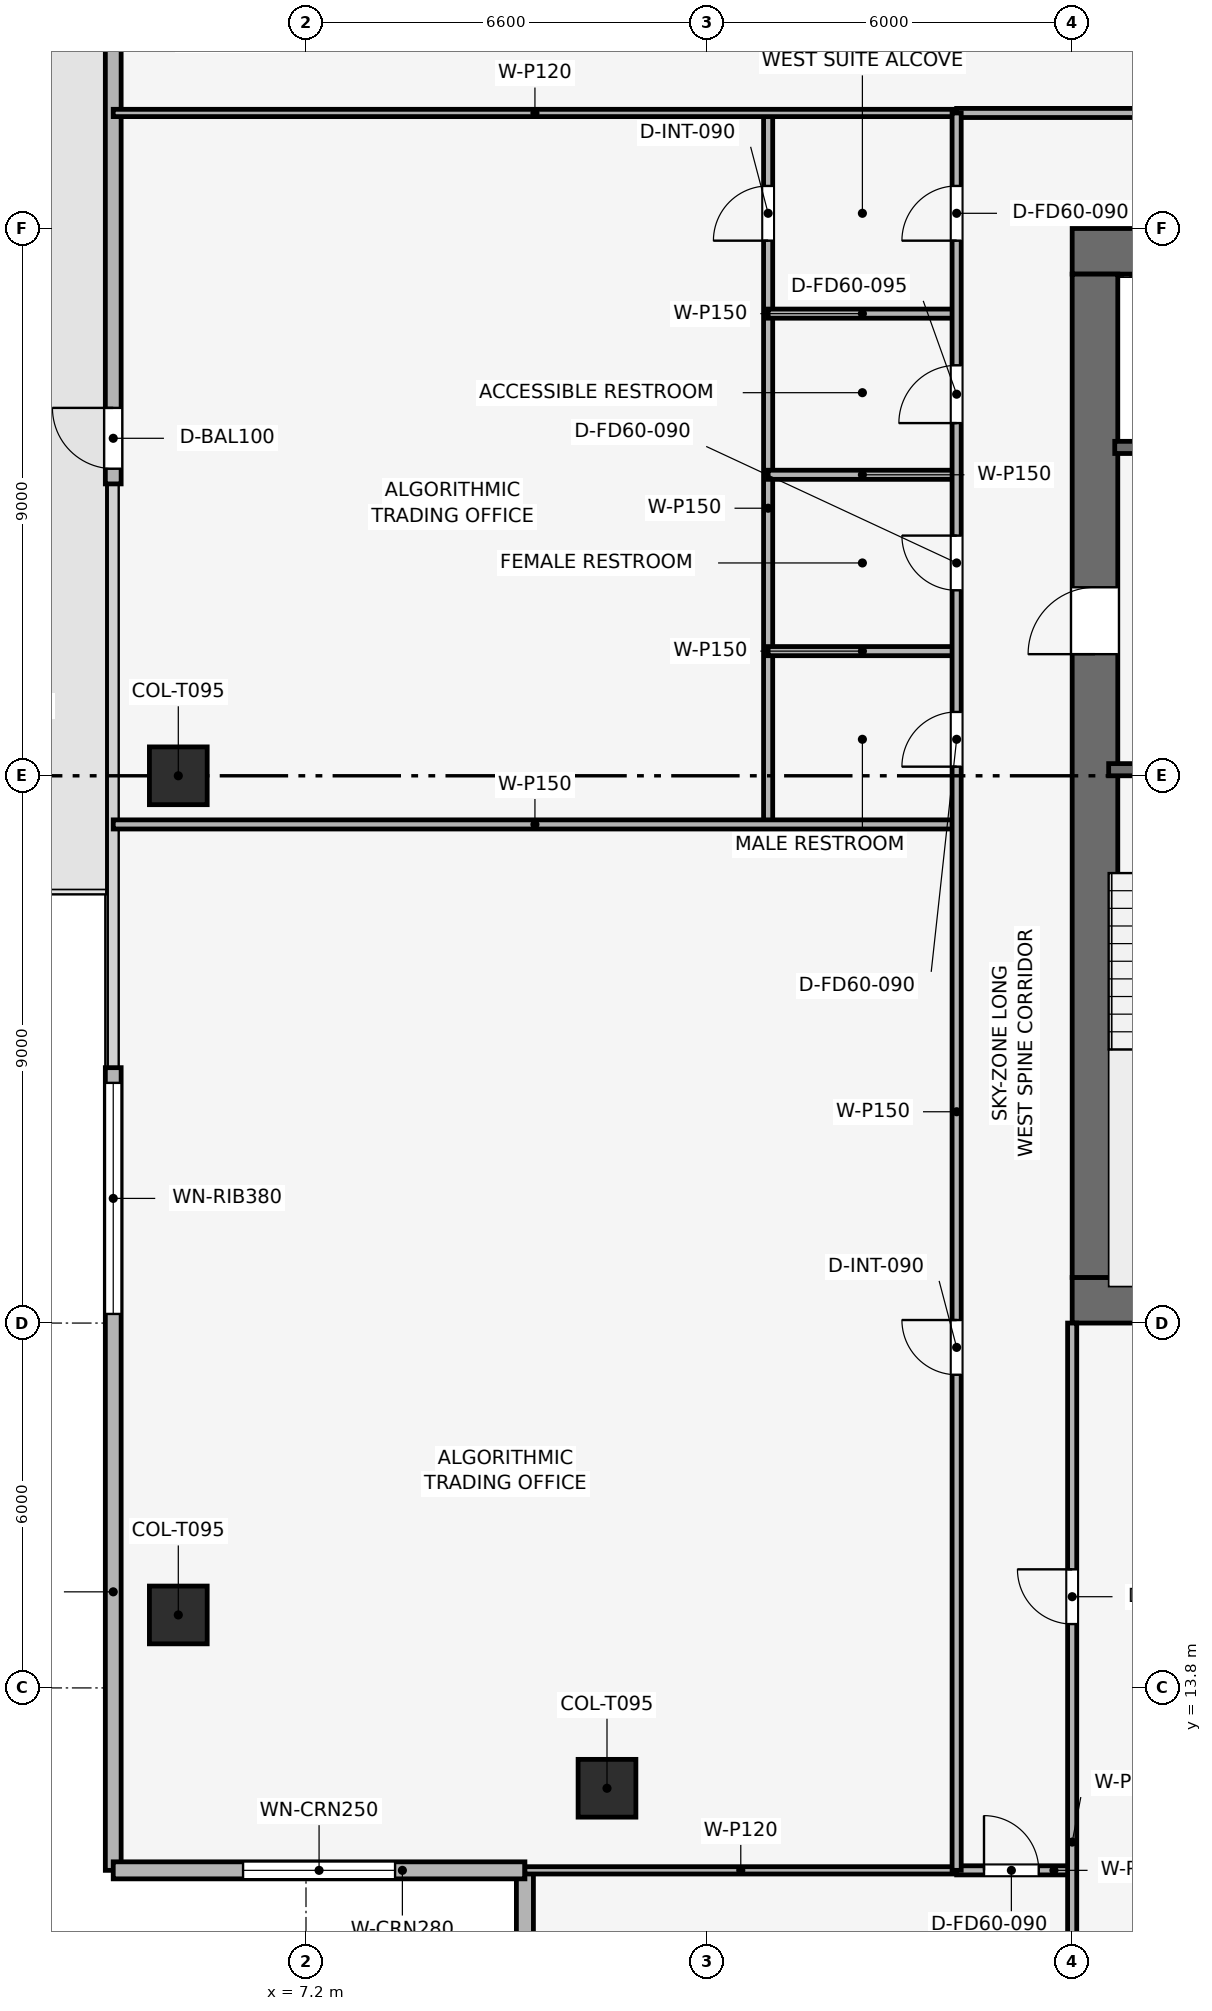
"""IFC4 building model, lengths in metres.
Left out: names, types, materials, properties, quantities, classifications, styles, units other than length and angle.
Written with IfcOpenShell. Run it as: python <this file> out.ifc"""

import sys

from ifc_helpers import new_model, si_unit, direction, frame, frame_2d, origin, origin_2d, place, context, subcontext, project, spatial, rectangle, extrude, element, fill, save


model = new_model("IFC4")
c1 = context("Model", 3, precision=1e-05, world=origin(), true_north=direction((0.0, 1.0)))
c2 = subcontext(c1, "Body", "Model", "MODEL_VIEW")
j1 = project(units=[si_unit("LENGTHUNIT", "METRE"), si_unit("PLANEANGLEUNIT", "RADIAN")], contexts=[c1])
p1 = place(None, origin())
s1 = spatial("IfcSite", under=j1, at=p1, CompositionType="ELEMENT")
p2 = place(p1, origin())
s2 = spatial("IfcBuilding", under=s1, at=p2, CompositionType="ELEMENT")
p3 = place(p2, frame((0.0, 0.0, 276.6)))
s3 = spatial("IfcBuildingStorey", under=s2, at=p3, CompositionType="ELEMENT", Elevation=276.6)
p4 = place(p3, frame((19.8, 20.175, 0.0), z_axis=(0.0, 0.0, 1.0), x_axis=(1.0, 0.0, 0.0)))
e1 = element("IfcWall", 1, at=p4, inside=s3, PredefinedType="SHEAR", context=c2, shape_type="SweptSolid", body=[
    extrude(rectangle(XDim=18.0, YDim=0.75, at=frame_2d((9.0, 0.0))), origin(), (0.0, 0.0, 1.0), 3.75),
])
p5 = place(p3, frame((19.8, 37.425, 0.0), z_axis=(0.0, 0.0, 1.0), x_axis=(1.0, 0.0, 0.0)))
e2 = element("IfcWall", 2, at=p5, inside=s3, PredefinedType="SHEAR", context=c2, shape_type="SweptSolid", body=[
    extrude(rectangle(XDim=18.0, YDim=0.75, at=frame_2d((9.0, 0.0))), origin(), (0.0, 0.0, 1.0), 3.75),
])
p6 = place(p5, frame((7.05, 0.0, 0.0)))
e3 = element("IfcOpeningElement", 3, at=p6, cuts=e2, PredefinedType="OPENING", context=c2, shape_type="SweptSolid", body=[
    extrude(rectangle(XDim=1.1, YDim=2.15, at=frame_2d((0.55, 1.075))), frame((0.0, 0.385, 0.0), z_axis=(0.0, -1.0, 0.0), x_axis=(1.0, 0.0, 0.0)), (0.0, 0.0, 1.0), 0.77),
])
p7 = place(p3, frame((20.175, 20.55, 0.0), z_axis=(0.0, 0.0, 1.0), x_axis=(0.0, 1.0, 0.0)))
e4 = element("IfcWall", 4, at=p7, inside=s3, PredefinedType="SHEAR", context=c2, shape_type="SweptSolid", body=[
    extrude(rectangle(XDim=16.5, YDim=0.75, at=frame_2d((8.25, 0.0))), origin(), (0.0, 0.0, 1.0), 3.75),
])
p8 = place(p7, frame((10.25, 0.0, 0.0)))
e5 = element("IfcOpeningElement", 5, at=p8, cuts=e4, PredefinedType="OPENING", context=c2, shape_type="SweptSolid", body=[
    extrude(rectangle(XDim=1.1, YDim=2.15, at=frame_2d((0.55, 1.075))), frame((0.0, 0.385, 0.0), z_axis=(0.0, -1.0, 0.0), x_axis=(1.0, 0.0, 0.0)), (0.0, 0.0, 1.0), 0.77),
])
for number, where, z_axis, x_axis in (
    (6, (5.1, 28.8, 0.003), (0.0, 0.0, 1.0), (1.0, 0.0, 0.0)),
    (7, (5.1, 15.0, 0.003), (0.0, 0.0, 1.0), (1.0, 0.0, 0.0)),
    (8, (12.15, 12.15, 0.003), (0.0, 0.0, 1.0), (1.0, 0.0, 0.0)),
):
    element("IfcColumn", number, at=place(p3, frame(where, z_axis=z_axis, x_axis=x_axis)), inside=s3, PredefinedType="COLUMN", context=c2, shape_type="SweptSolid", body=[
        extrude(rectangle(XDim=0.95, YDim=0.95, at=origin_2d()), origin(), (0.0, 0.0, 1.0), 3.494),
    ])
p9 = place(p3, frame((4.03, 10.8, 0.0), z_axis=(0.0, 0.0, 1.0), x_axis=(0.0, 1.0, 0.0)))
e9 = element("IfcWall", 9, at=p9, inside=s3, PredefinedType="SOLIDWALL", context=c2, shape_type="SweptSolid", body=[
    extrude(rectangle(XDim=13.2, YDim=0.26, at=frame_2d((6.6, 0.0))), origin(), (0.0, 0.0, 1.0), 3.5),
])
p10 = place(p9, frame((9.15, 0.0, 0.9)))
e10 = element("IfcOpeningElement", 10, at=p10, cuts=e9, PredefinedType="OPENING", context=c2, shape_type="SweptSolid", body=[
    extrude(rectangle(XDim=3.8, YDim=1.9, at=frame_2d((1.9, 0.95))), frame((0.0, 0.14, 0.0), z_axis=(0.0, -1.0, 0.0), x_axis=(1.0, 0.0, 0.0)), (0.0, 0.0, 1.0), 0.28),
])
p11 = place(p3, frame((4.03, 33.6, 0.0), z_axis=(0.0, 0.0, 1.0), x_axis=(0.0, 1.0, 0.0)))
e11 = element("IfcWall", 11, at=p11, inside=s3, PredefinedType="SOLIDWALL", context=c2, shape_type="SweptSolid", body=[
    extrude(rectangle(XDim=13.2, YDim=0.26, at=frame_2d((6.6, 0.0))), origin(), (0.0, 0.0, 1.0), 3.5),
])
p12 = place(p11, frame((0.25, 0.0, 0.0)))
e12 = element("IfcOpeningElement", 12, at=p12, cuts=e11, PredefinedType="OPENING", context=c2, shape_type="SweptSolid", body=[
    extrude(rectangle(XDim=1.0, YDim=2.2, at=frame_2d((0.5, 1.1))), frame((0.0, 0.14, 0.0), z_axis=(0.0, -1.0, 0.0), x_axis=(1.0, 0.0, 0.0)), (0.0, 0.0, 1.0), 0.28),
])
p13 = place(p3, frame((10.8, 4.03, 0.0), z_axis=(0.0, 0.0, 1.0), x_axis=(0.0, 1.0, 0.0)))
e13 = element("IfcWall", 13, at=p13, inside=s3, PredefinedType="SOLIDWALL", context=c2, shape_type="SweptSolid", body=[
    extrude(rectangle(XDim=6.77, YDim=0.28, at=frame_2d((3.385, 0.0))), origin(), (0.0, 0.0, 1.0), 3.5),
])
p14 = place(p13, frame((2.135, 0.0, 0.9)))
e14 = element("IfcOpeningElement", 14, at=p14, cuts=e13, PredefinedType="OPENING", context=c2, shape_type="SweptSolid", body=[
    extrude(rectangle(XDim=2.5, YDim=1.9, at=frame_2d((1.25, 0.95))), frame((0.0, 0.15, 0.0), z_axis=(0.0, -1.0, 0.0), x_axis=(1.0, 0.0, 0.0)), (0.0, 0.0, 1.0), 0.3),
])
p15 = place(p3, frame((10.8, 10.8, 0.0), z_axis=(0.0, 0.0, 1.0), x_axis=(-1.0, 0.0, 0.0)))
e15 = element("IfcWall", 15, at=p15, inside=s3, PredefinedType="SOLIDWALL", context=c2, shape_type="SweptSolid", body=[
    extrude(rectangle(XDim=6.77, YDim=0.28, at=frame_2d((3.385, 0.0))), origin(), (0.0, 0.0, 1.0), 3.5),
])
p16 = place(p15, frame((2.135, 0.0, 0.9)))
e16 = element("IfcOpeningElement", 16, at=p16, cuts=e15, PredefinedType="OPENING", context=c2, shape_type="SweptSolid", body=[
    extrude(rectangle(XDim=2.5, YDim=1.9, at=frame_2d((1.25, 0.95))), frame((0.0, 0.15, 0.0), z_axis=(0.0, -1.0, 0.0), x_axis=(1.0, 0.0, 0.0)), (0.0, 0.0, 1.0), 0.3),
])
p17 = place(p3, frame((20.4, 28.9, 0.0), z_axis=(0.0, 0.0, 1.0), x_axis=(1.0, 0.0, 0.0)))
e17 = element("IfcWall", 17, at=p17, inside=s3, PredefinedType="SHEAR", context=c2, shape_type="SweptSolid", body=[
    extrude(rectangle(XDim=3.15, YDim=0.2, at=frame_2d((1.575, 0.0))), origin(), (0.0, 0.0, 1.0), 3.5),
])
p18 = place(p17, frame((0.8, 0.0, 0.0)))
e18 = element("IfcOpeningElement", 18, at=p18, cuts=e17, PredefinedType="OPENING", context=c2, shape_type="SweptSolid", body=[
    extrude(rectangle(XDim=1.0, YDim=2.1, at=frame_2d((0.5, 1.05))), frame((0.0, 0.11, 0.0), z_axis=(0.0, -1.0, 0.0), x_axis=(1.0, 0.0, 0.0)), (0.0, 0.0, 1.0), 0.22),
])
p19 = place(p3, frame((20.5, 34.2, 0.0), z_axis=(0.0, 0.0, 1.0), x_axis=(1.0, 0.0, 0.0)))
e19 = element("IfcWall", 19, at=p19, inside=s3, PredefinedType="SHEAR", context=c2, shape_type="SweptSolid", body=[
    extrude(rectangle(XDim=3.05, YDim=0.2, at=frame_2d((1.525, 0.0))), origin(), (0.0, 0.0, 1.0), 3.5),
])
p20 = place(p19, frame((0.75, 0.0, 0.0)))
e20 = element("IfcOpeningElement", 20, at=p20, cuts=e19, PredefinedType="OPENING", context=c2, shape_type="SweptSolid", body=[
    extrude(rectangle(XDim=1.1, YDim=2.15, at=frame_2d((0.55, 1.075))), frame((0.0, 0.11, 0.0), z_axis=(0.0, -1.0, 0.0), x_axis=(1.0, 0.0, 0.0)), (0.0, 0.0, 1.0), 0.22),
])
p21 = place(p3, frame((14.8, 28.0, 0.0), z_axis=(0.0, 0.0, 1.0), x_axis=(0.0, 1.0, 0.0)))
e21 = element("IfcWall", 21, at=p21, inside=s3, PredefinedType="PARTITIONING", context=c2, shape_type="SweptSolid", body=[
    extrude(rectangle(XDim=11.7, YDim=0.15, at=frame_2d((5.85, 0.0))), origin(), (0.0, 0.0, 1.0), 3.085),
])
p22 = place(p21, frame((9.6, 0.0, 0.0)))
e22 = element("IfcOpeningElement", 22, at=p22, cuts=e21, PredefinedType="OPENING", context=c2, shape_type="SweptSolid", body=[
    extrude(rectangle(XDim=0.9, YDim=2.1, at=frame_2d((0.45, 1.05))), frame((0.0, 0.085, 0.0), z_axis=(0.0, -1.0, 0.0), x_axis=(1.0, 0.0, 0.0)), (0.0, 0.0, 1.0), 0.17),
])
p23 = place(p3, frame((4.03, 28.0, 0.0), z_axis=(0.0, 0.0, 1.0), x_axis=(1.0, 0.0, 0.0)))
e23 = element("IfcWall", 23, at=p23, inside=s3, PredefinedType="PARTITIONING", context=c2, shape_type="SweptSolid", body=[
    extrude(rectangle(XDim=13.87, YDim=0.15, at=frame_2d((6.935, 0.0))), origin(), (0.0, 0.0, 1.0), 3.085),
])
for number, where, z_axis, x_axis in (
    (24, (14.8, 36.4, 0.0), (0.0, 0.0, 1.0), (1.0, 0.0, 0.0)),
    (25, (14.8, 30.85, 0.0), (0.0, 0.0, 1.0), (1.0, 0.0, 0.0)),
    (26, (14.8, 33.75, 0.0), (0.0, 0.0, 1.0), (1.0, 0.0, 0.0)),
):
    element("IfcWall", number, at=place(p3, frame(where, z_axis=z_axis, x_axis=x_axis)), inside=s3, PredefinedType="PARTITIONING", context=c2, shape_type="SweptSolid", body=[
        extrude(rectangle(XDim=3.1, YDim=0.15, at=frame_2d((1.55, 0.0))), origin(), (0.0, 0.0, 1.0), 3.5),
    ])
p24 = place(p3, frame((10.8, 10.8, 0.0), z_axis=(0.0, 0.0, 1.0), x_axis=(1.0, 0.0, 0.0)))
e27 = element("IfcWall", 27, at=p24, inside=s3, PredefinedType="PARTITIONING", context=c2, shape_type="SweptSolid", body=[
    extrude(rectangle(XDim=7.1, YDim=0.12, at=frame_2d((3.55, 0.0))), origin(), (0.0, 0.0, 1.0), 3.085),
])
p25 = place(p3, frame((17.9, 10.8, 0.0), z_axis=(0.0, 0.0, 1.0), x_axis=(1.0, 0.0, 0.0)))
e28 = element("IfcWall", 28, at=p25, inside=s3, PredefinedType="PARTITIONING", context=c2, shape_type="SweptSolid", body=[
    extrude(rectangle(XDim=1.9, YDim=0.15, at=frame_2d((0.95, 0.0))), origin(), (0.0, 0.0, 1.0), 3.5),
])
p26 = place(p25, frame((0.45, 0.0, 0.0)))
e29 = element("IfcOpeningElement", 29, at=p26, cuts=e28, PredefinedType="OPENING", context=c2, shape_type="SweptSolid", body=[
    extrude(rectangle(XDim=0.9, YDim=2.1, at=frame_2d((0.45, 1.05))), frame((0.0, 0.085, 0.0), z_axis=(0.0, -1.0, 0.0), x_axis=(1.0, 0.0, 0.0)), (0.0, 0.0, 1.0), 0.17),
])
p27 = place(p3, frame((19.8, 4.03, 0.0), z_axis=(0.0, 0.0, 1.0), x_axis=(0.0, 1.0, 0.0)))
e30 = element("IfcWall", 30, at=p27, inside=s3, PredefinedType="PARTITIONING", context=c2, shape_type="SweptSolid", body=[
    extrude(rectangle(XDim=15.77, YDim=0.15, at=frame_2d((7.885, 0.0))), origin(), (0.0, 0.0, 1.0), 3.085),
])
p28 = place(p27, frame((10.82, 0.0, 0.0)))
e31 = element("IfcOpeningElement", 31, at=p28, cuts=e30, PredefinedType="OPENING", context=c2, shape_type="SweptSolid", body=[
    extrude(rectangle(XDim=0.9, YDim=2.1, at=frame_2d((0.45, 1.05))), frame((0.0, 0.085, 0.0), z_axis=(0.0, -1.0, 0.0), x_axis=(1.0, 0.0, 0.0)), (0.0, 0.0, 1.0), 0.17),
])
p29 = place(p3, frame((4.03, 39.7, 0.0), z_axis=(0.0, 0.0, 1.0), x_axis=(1.0, 0.0, 0.0)))
e32 = element("IfcWall", 32, at=p29, inside=s3, PredefinedType="PARTITIONING", context=c2, shape_type="SweptSolid", body=[
    extrude(rectangle(XDim=13.87, YDim=0.12, at=frame_2d((6.935, 0.0))), origin(), (0.0, 0.0, 1.0), 3.085),
])
p30 = place(p3, frame((17.9, 39.7, 0.0), z_axis=(0.0, 0.0, 1.0), x_axis=(1.0, 0.0, 0.0)))
e33 = element("IfcWall", 33, at=p30, inside=s3, PredefinedType="PARTITIONING", context=c2, shape_type="SweptSolid", body=[
    extrude(rectangle(XDim=21.8, YDim=0.15, at=frame_2d((10.9, 0.0))), origin(), (0.0, 0.0, 1.0), 3.085),
])
p31 = place(p30, frame((10.45, 0.0, 0.0)))
e34 = element("IfcOpeningElement", 34, at=p31, cuts=e33, PredefinedType="OPENING", context=c2, shape_type="SweptSolid", body=[
    extrude(rectangle(XDim=0.9, YDim=2.1, at=frame_2d((0.45, 1.05))), frame((0.0, 0.085, 0.0), z_axis=(0.0, -1.0, 0.0), x_axis=(1.0, 0.0, 0.0)), (0.0, 0.0, 1.0), 0.17),
])
p32 = place(p3, frame((17.9, 10.8, 0.0), z_axis=(0.0, 0.0, 1.0), x_axis=(0.0, 1.0, 0.0)))
e35 = element("IfcWall", 35, at=p32, inside=s3, PredefinedType="PARTITIONING", context=c2, shape_type="SweptSolid", body=[
    extrude(rectangle(XDim=28.9, YDim=0.15, at=frame_2d((14.45, 0.0))), origin(), (0.0, 0.0, 1.0), 3.085),
])
p33 = place(p32, frame((8.15, 0.0, 0.0)))
e36 = element("IfcOpeningElement", 36, at=p33, cuts=e35, PredefinedType="OPENING", context=c2, shape_type="SweptSolid", body=[
    extrude(rectangle(XDim=0.9, YDim=2.1, at=frame_2d((0.45, 1.05))), frame((0.0, 0.085, 0.0), z_axis=(0.0, -1.0, 0.0), x_axis=(1.0, 0.0, 0.0)), (0.0, 0.0, 1.0), 0.17),
])
p34 = place(p32, frame((18.15, 0.0, 0.0)))
e37 = element("IfcOpeningElement", 37, at=p34, cuts=e35, PredefinedType="OPENING", context=c2, shape_type="SweptSolid", body=[
    extrude(rectangle(XDim=0.9, YDim=2.1, at=frame_2d((0.45, 1.05))), frame((0.0, 0.085, 0.0), z_axis=(0.0, -1.0, 0.0), x_axis=(1.0, 0.0, 0.0)), (0.0, 0.0, 1.0), 0.17),
])
p35 = place(p32, frame((21.05, 0.0, 0.0)))
e38 = element("IfcOpeningElement", 38, at=p35, cuts=e35, PredefinedType="OPENING", context=c2, shape_type="SweptSolid", body=[
    extrude(rectangle(XDim=0.9, YDim=2.1, at=frame_2d((0.45, 1.05))), frame((0.0, 0.085, 0.0), z_axis=(0.0, -1.0, 0.0), x_axis=(1.0, 0.0, 0.0)), (0.0, 0.0, 1.0), 0.17),
])
p36 = place(p32, frame((23.8, 0.0, 0.0)))
e39 = element("IfcOpeningElement", 39, at=p36, cuts=e35, PredefinedType="OPENING", context=c2, shape_type="SweptSolid", body=[
    extrude(rectangle(XDim=0.95, YDim=2.1, at=frame_2d((0.475, 1.05))), frame((0.0, 0.085, 0.0), z_axis=(0.0, -1.0, 0.0), x_axis=(1.0, 0.0, 0.0)), (0.0, 0.0, 1.0), 0.17),
])
p37 = place(p32, frame((26.8, 0.0, 0.0)))
e40 = element("IfcOpeningElement", 40, at=p37, cuts=e35, PredefinedType="OPENING", context=c2, shape_type="SweptSolid", body=[
    extrude(rectangle(XDim=0.9, YDim=2.1, at=frame_2d((0.45, 1.05))), frame((0.0, 0.085, 0.0), z_axis=(0.0, -1.0, 0.0), x_axis=(1.0, 0.0, 0.0)), (0.0, 0.0, 1.0), 0.17),
])
p38 = place(p12, origin())
e41 = element("IfcDoor", 41, at=p38, inside=s3, OperationType="SINGLE_SWING_RIGHT", PredefinedType="DOOR", context=c2, shape_type="SweptSolid", body=[
    extrude(rectangle(XDim=1.0, YDim=2.2, at=frame_2d((0.5, 1.1))), frame((0.0, 0.025, 0.0), z_axis=(0.0, -1.0, 0.0), x_axis=(1.0, 0.0, 0.0)), (0.0, 0.0, 1.0), 0.05),
])
fill(e12, e41)
p39 = place(p10, origin())
e42 = element("IfcWindow", 42, at=p39, inside=s3, PartitioningType="SINGLE_PANEL", PredefinedType="WINDOW", context=c2, shape_type="SweptSolid", body=[
    extrude(rectangle(XDim=3.8, YDim=1.9, at=frame_2d((1.9, 0.95))), frame((0.0, 0.03, 0.0), z_axis=(0.0, -1.0, 0.0), x_axis=(1.0, 0.0, 0.0)), (0.0, 0.0, 1.0), 0.06),
])
fill(e10, e42)
p40 = place(p16, origin())
e43 = element("IfcWindow", 43, at=p40, inside=s3, PartitioningType="SINGLE_PANEL", PredefinedType="WINDOW", context=c2, shape_type="SweptSolid", body=[
    extrude(rectangle(XDim=2.5, YDim=1.9, at=frame_2d((1.25, 0.95))), frame((0.0, 0.03, 0.0), z_axis=(0.0, -1.0, 0.0), x_axis=(1.0, 0.0, 0.0)), (0.0, 0.0, 1.0), 0.06),
])
fill(e16, e43)
p41 = place(p22, origin())
e44 = element("IfcDoor", 44, at=p41, inside=s3, OperationType="SINGLE_SWING_LEFT", PredefinedType="DOOR", context=c2, shape_type="SweptSolid", body=[
    extrude(rectangle(XDim=0.9, YDim=2.1, at=frame_2d((0.45, 1.05))), frame((0.0, 0.025, 0.0), z_axis=(0.0, -1.0, 0.0), x_axis=(1.0, 0.0, 0.0)), (0.0, 0.0, 1.0), 0.05),
])
fill(e22, e44)
p42 = place(p26, origin())
e45 = element("IfcDoor", 45, at=p42, inside=s3, OperationType="SINGLE_SWING_LEFT", PredefinedType="DOOR", context=c2, shape_type="SweptSolid", body=[
    extrude(rectangle(XDim=0.9, YDim=2.1, at=frame_2d((0.45, 1.05))), frame((0.0, 0.025, 0.0), z_axis=(0.0, -1.0, 0.0), x_axis=(1.0, 0.0, 0.0)), (0.0, 0.0, 1.0), 0.05),
])
fill(e29, e45)
p43 = place(p28, origin())
e46 = element("IfcDoor", 46, at=p43, inside=s3, OperationType="SINGLE_SWING_RIGHT", PredefinedType="DOOR", context=c2, shape_type="SweptSolid", body=[
    extrude(rectangle(XDim=0.9, YDim=2.1, at=frame_2d((0.45, 1.05))), frame((0.0, 0.025, 0.0), z_axis=(0.0, -1.0, 0.0), x_axis=(1.0, 0.0, 0.0)), (0.0, 0.0, 1.0), 0.05),
])
fill(e31, e46)
p44 = place(p33, origin())
e47 = element("IfcDoor", 47, at=p44, inside=s3, OperationType="SINGLE_SWING_RIGHT", PredefinedType="DOOR", context=c2, shape_type="SweptSolid", body=[
    extrude(rectangle(XDim=0.9, YDim=2.1, at=frame_2d((0.45, 1.05))), frame((0.0, 0.025, 0.0), z_axis=(0.0, -1.0, 0.0), x_axis=(1.0, 0.0, 0.0)), (0.0, 0.0, 1.0), 0.05),
])
fill(e36, e47)
p45 = place(p34, origin())
e48 = element("IfcDoor", 48, at=p45, inside=s3, OperationType="SINGLE_SWING_LEFT", PredefinedType="DOOR", context=c2, shape_type="SweptSolid", body=[
    extrude(rectangle(XDim=0.9, YDim=2.1, at=frame_2d((0.45, 1.05))), frame((0.0, 0.025, 0.0), z_axis=(0.0, -1.0, 0.0), x_axis=(1.0, 0.0, 0.0)), (0.0, 0.0, 1.0), 0.05),
])
fill(e37, e48)
p46 = place(p35, origin())
e49 = element("IfcDoor", 49, at=p46, inside=s3, OperationType="SINGLE_SWING_RIGHT", PredefinedType="DOOR", context=c2, shape_type="SweptSolid", body=[
    extrude(rectangle(XDim=0.9, YDim=2.1, at=frame_2d((0.45, 1.05))), frame((0.0, 0.025, 0.0), z_axis=(0.0, -1.0, 0.0), x_axis=(1.0, 0.0, 0.0)), (0.0, 0.0, 1.0), 0.05),
])
fill(e38, e49)
p47 = place(p36, origin())
e50 = element("IfcDoor", 50, at=p47, inside=s3, OperationType="SINGLE_SWING_LEFT", PredefinedType="DOOR", context=c2, shape_type="SweptSolid", body=[
    extrude(rectangle(XDim=0.95, YDim=2.1, at=frame_2d((0.475, 1.05))), frame((0.0, 0.025, 0.0), z_axis=(0.0, -1.0, 0.0), x_axis=(1.0, 0.0, 0.0)), (0.0, 0.0, 1.0), 0.05),
])
fill(e39, e50)
p48 = place(p37, origin())
e51 = element("IfcDoor", 51, at=p48, inside=s3, OperationType="SINGLE_SWING_LEFT", PredefinedType="DOOR", context=c2, shape_type="SweptSolid", body=[
    extrude(rectangle(XDim=0.9, YDim=2.1, at=frame_2d((0.45, 1.05))), frame((0.0, 0.025, 0.0), z_axis=(0.0, -1.0, 0.0), x_axis=(1.0, 0.0, 0.0)), (0.0, 0.0, 1.0), 0.05),
])
fill(e40, e51)
p49 = place(p8, origin())
e52 = element("IfcDoor", 52, at=p49, inside=s3, OperationType="SINGLE_SWING_LEFT", PredefinedType="DOOR", context=c2, shape_type="SweptSolid", body=[
    extrude(rectangle(XDim=1.1, YDim=2.15, at=frame_2d((0.55, 1.075))), frame((0.0, 0.025, 0.0), z_axis=(0.0, -1.0, 0.0), x_axis=(1.0, 0.0, 0.0)), (0.0, 0.0, 1.0), 0.05),
])
fill(e5, e52)
save(model, sys.argv[1])
